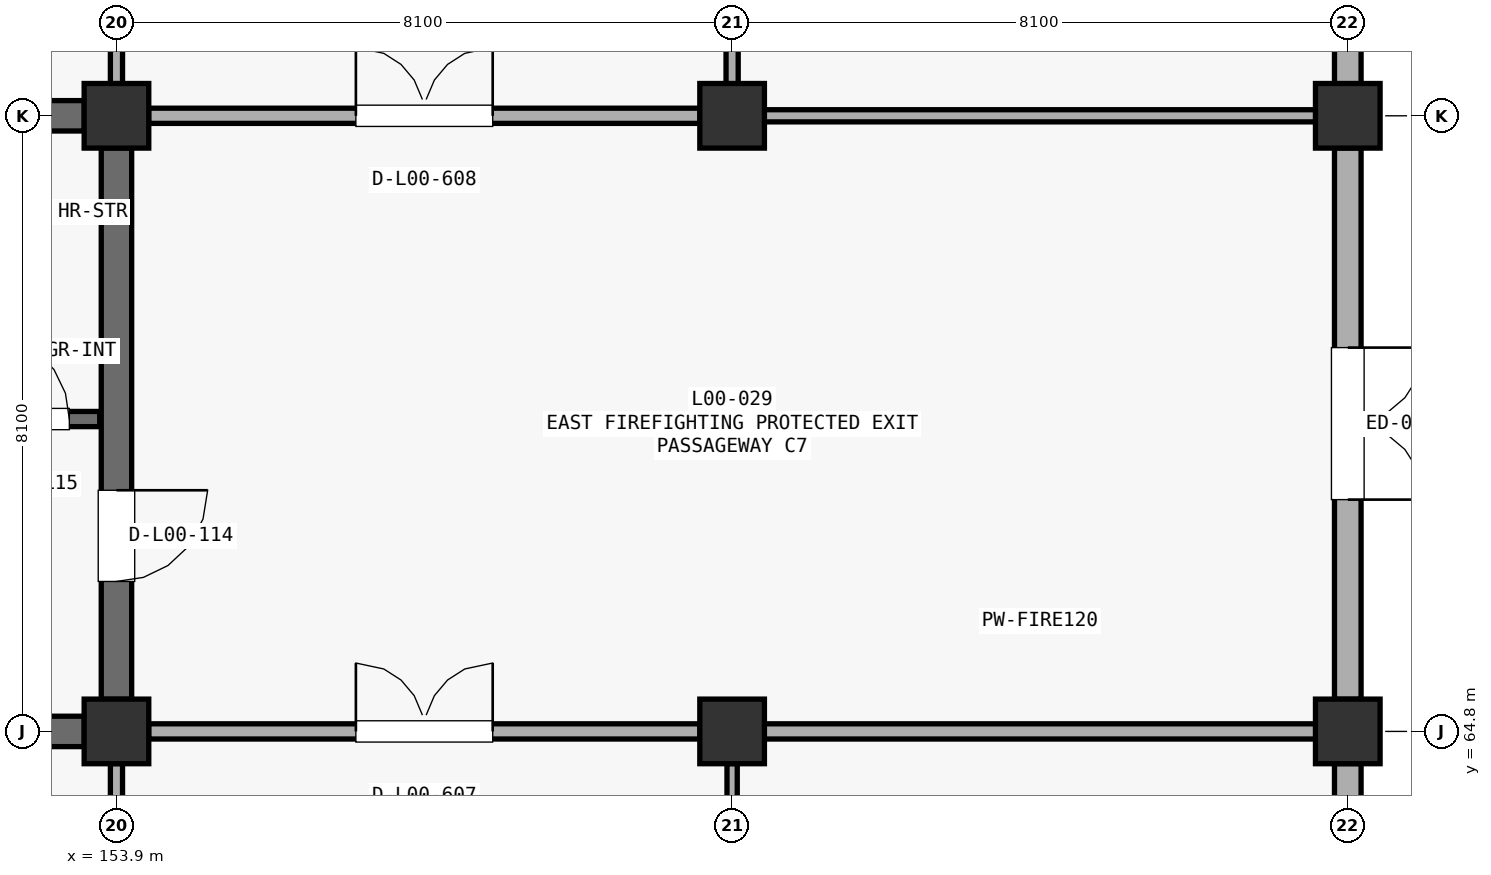
"""IFC4 building model, lengths in metres.
Left out: names, types, materials, properties, quantities, classifications, styles, units other than length and angle.
Written with IfcOpenShell. Run it as: python <this file> out.ifc"""

import sys

from ifc_helpers import new_model, si_unit, direction, frame, frame_2d, origin, origin_2d, place, context, subcontext, project, spatial, rectangle, extrude, element, fill, save


model = new_model("IFC4")
c1 = context("Model", 3, precision=1e-05, world=origin(), true_north=direction((0.0, 1.0)))
c2 = subcontext(c1, "Body", "Model", "MODEL_VIEW")
j1 = project(units=[si_unit("LENGTHUNIT", "METRE"), si_unit("PLANEANGLEUNIT", "RADIAN")], contexts=[c1])
p1 = place(None, origin())
s1 = spatial("IfcSite", under=j1, at=p1, CompositionType="ELEMENT")
p2 = place(p1, origin())
s2 = spatial("IfcBuilding", under=s1, at=p2, CompositionType="ELEMENT")
p3 = place(p2, origin())
s3 = spatial("IfcBuildingStorey", under=s2, at=p3, CompositionType="ELEMENT", Elevation=0.0)
for number, where, z_axis, x_axis in (
    (1, (153.9, 64.8, 0.0), (0.0, 0.0, 1.0), (1.0, 0.0, 0.0)),
    (2, (153.9, 72.9, 0.0), (0.0, 0.0, 1.0), (1.0, 0.0, 0.0)),
    (3, (162.0, 64.8, 0.0), (0.0, 0.0, 1.0), (1.0, 0.0, 0.0)),
    (4, (162.0, 72.9, 0.0), (0.0, 0.0, 1.0), (1.0, 0.0, 0.0)),
    (5, (170.1, 64.8, 0.0), (0.0, 0.0, 1.0), (1.0, 0.0, 0.0)),
    (6, (170.1, 72.9, 0.0), (0.0, 0.0, 1.0), (1.0, 0.0, 0.0)),
):
    element("IfcColumn", number, at=place(p3, frame(where, z_axis=z_axis, x_axis=x_axis)), inside=s3, PredefinedType="COLUMN", context=c2, shape_type="SweptSolid", body=[
        extrude(rectangle(XDim=0.85, YDim=0.85, at=origin_2d()), origin(), (0.0, 0.0, 1.0), 5.1),
    ])
p4 = place(p3, frame((170.1, 57.123, 0.0), z_axis=(0.0, 0.0, 1.0), x_axis=(0.0, 1.0, 0.0)))
e7 = element("IfcWall", 7, at=p4, inside=s3, PredefinedType="STANDARD", context=c2, shape_type="SweptSolid", body=[
    extrude(rectangle(XDim=7.254, YDim=0.35, at=frame_2d((3.627, 0.0))), origin(), (0.0, 0.0, 1.0), 4.172),
])
p5 = place(p4, frame((2.952, 0.0, 0.85)))
e8 = element("IfcOpeningElement", 8, at=p5, cuts=e7, PredefinedType="OPENING", context=c2, shape_type="SweptSolid", body=[
    extrude(rectangle(XDim=1.35, YDim=1.95, at=frame_2d((0.675, 0.975))), frame((0.0, 0.185, 0.0), z_axis=(0.0, -1.0, 0.0), x_axis=(1.0, 0.0, 0.0)), (0.0, 0.0, 1.0), 0.37),
])
p6 = place(p3, frame((170.1, 65.223, 0.0), z_axis=(0.0, 0.0, 1.0), x_axis=(0.0, 1.0, 0.0)))
e9 = element("IfcWall", 9, at=p6, inside=s3, PredefinedType="STANDARD", context=c2, shape_type="SweptSolid", body=[
    extrude(rectangle(XDim=7.254, YDim=0.35, at=frame_2d((3.627, 0.0))), origin(), (0.0, 0.0, 1.0), 4.172),
])
p7 = place(p6, frame((4.627, 0.0, 0.0), z_axis=(0.0, 0.0, 1.0), x_axis=(-1.0, 0.0, 0.0)))
e10 = element("IfcOpeningElement", 10, at=p7, cuts=e9, PredefinedType="OPENING", context=c2, shape_type="SweptSolid", body=[
    extrude(rectangle(XDim=2.0, YDim=2.2, at=frame_2d((1.0, 1.1))), frame((0.0, 0.185, 0.0), z_axis=(0.0, -1.0, 0.0), x_axis=(1.0, 0.0, 0.0)), (0.0, 0.0, 1.0), 0.37),
])
p8 = place(p3, frame((170.1, 73.323, 0.0), z_axis=(0.0, 0.0, 1.0), x_axis=(0.0, 1.0, 0.0)))
e11 = element("IfcWall", 11, at=p8, inside=s3, PredefinedType="STANDARD", context=c2, shape_type="SweptSolid", body=[
    extrude(rectangle(XDim=7.254, YDim=0.35, at=frame_2d((3.627, 0.0))), origin(), (0.0, 0.0, 1.0), 4.222),
])
p9 = place(p8, frame((2.502, 0.0, 0.85)))
e12 = element("IfcOpeningElement", 12, at=p9, cuts=e11, PredefinedType="OPENING", context=c2, shape_type="SweptSolid", body=[
    extrude(rectangle(XDim=2.25, YDim=1.75, at=frame_2d((1.125, 0.875))), frame((0.0, 0.185, 0.0), z_axis=(0.0, -1.0, 0.0), x_axis=(1.0, 0.0, 0.0)), (0.0, 0.0, 1.0), 0.37),
])
p10 = place(p3, frame((146.223, 72.9, 0.0), z_axis=(0.0, 0.0, 1.0), x_axis=(1.0, 0.0, 0.0)))
e13 = element("IfcWall", 13, at=p10, inside=s3, PredefinedType="SHEAR", context=c2, shape_type="SweptSolid", body=[
    extrude(rectangle(XDim=7.254, YDim=0.4, at=frame_2d((3.627, 0.0))), origin(), (0.0, 0.0, 1.0), 4.822),
])
p11 = place(p3, frame((153.9, 65.223, 0.0), z_axis=(0.0, 0.0, 1.0), x_axis=(0.0, 1.0, 0.0)))
e14 = element("IfcWall", 14, at=p11, inside=s3, PredefinedType="SHEAR", context=c2, shape_type="SweptSolid", body=[
    extrude(rectangle(XDim=7.254, YDim=0.4, at=frame_2d((3.627, 0.0))), origin(), (0.0, 0.0, 1.0), 4.822),
])
p12 = place(p11, frame((2.75, 0.0, 0.0), z_axis=(0.0, 0.0, 1.0), x_axis=(-1.0, 0.0, 0.0)))
e15 = element("IfcOpeningElement", 15, at=p12, cuts=e14, PredefinedType="OPENING", context=c2, shape_type="SweptSolid", body=[
    extrude(rectangle(XDim=1.2, YDim=2.2, at=frame_2d((0.6, 1.1))), frame((0.0, 0.21, 0.0), z_axis=(0.0, -1.0, 0.0), x_axis=(1.0, 0.0, 0.0)), (0.0, 0.0, 1.0), 0.42),
])
p13 = place(p3, frame((146.223, 64.8, 0.0), z_axis=(0.0, 0.0, 1.0), x_axis=(1.0, 0.0, 0.0)))
e16 = element("IfcWall", 16, at=p13, inside=s3, PredefinedType="SHEAR", context=c2, shape_type="SweptSolid", body=[
    extrude(rectangle(XDim=7.254, YDim=0.4, at=frame_2d((3.627, 0.0))), origin(), (0.0, 0.0, 1.0), 4.822),
])
p14 = place(p3, frame((146.02, 68.91, 0.0), z_axis=(0.0, 0.0, 1.0), x_axis=(1.0, 0.0, 0.0)))
e17 = element("IfcWall", 17, at=p14, inside=s3, PredefinedType="SHEAR", context=c2, shape_type="SweptSolid", body=[
    extrude(rectangle(XDim=7.66, YDim=0.2, at=frame_2d((3.83, 0.0))), origin(), (0.0, 0.0, 1.0), 4.822),
])
p15 = place(p14, frame((6.11, 0.0, 0.0)))
e18 = element("IfcOpeningElement", 18, at=p15, cuts=e17, PredefinedType="OPENING", context=c2, shape_type="SweptSolid", body=[
    extrude(rectangle(XDim=1.15, YDim=2.2, at=frame_2d((0.575, 1.1))), frame((0.0, 0.11, 0.0), z_axis=(0.0, -1.0, 0.0), x_axis=(1.0, 0.0, 0.0)), (0.0, 0.0, 1.0), 0.22),
])
p16 = place(p3, frame((153.9, 73.323, 0.0), z_axis=(0.0, 0.0, 1.0), x_axis=(0.0, 1.0, 0.0)))
e19 = element("IfcWall", 19, at=p16, inside=s3, PredefinedType="PARTITIONING", context=c2, shape_type="SweptSolid", body=[
    extrude(rectangle(XDim=7.254, YDim=0.16, at=frame_2d((3.627, 0.0))), origin(), (0.0, 0.0, 1.0), 3.972),
])
p17 = place(p16, frame((2.917, 0.0, 0.0)))
e20 = element("IfcOpeningElement", 20, at=p17, cuts=e19, PredefinedType="OPENING", context=c2, shape_type="SweptSolid", body=[
    extrude(rectangle(XDim=1.42, YDim=2.25, at=frame_2d((0.71, 1.125))), frame((0.0, 0.09, 0.0), z_axis=(0.0, -1.0, 0.0), x_axis=(1.0, 0.0, 0.0)), (0.0, 0.0, 1.0), 0.18),
])
p18 = place(p3, frame((162.0, 57.123, 0.0), z_axis=(0.0, 0.0, 1.0), x_axis=(0.0, 1.0, 0.0)))
e21 = element("IfcWall", 21, at=p18, inside=s3, PredefinedType="PARTITIONING", context=c2, shape_type="SweptSolid", body=[
    extrude(rectangle(XDim=7.254, YDim=0.135, at=frame_2d((3.627, 0.0))), origin(), (0.0, 0.0, 1.0), 3.972),
])
p19 = place(p3, frame((162.423, 64.8, 0.0), z_axis=(0.0, 0.0, 1.0), x_axis=(1.0, 0.0, 0.0)))
e22 = element("IfcWall", 22, at=p19, inside=s3, PredefinedType="PARTITIONING", context=c2, shape_type="SweptSolid", body=[
    extrude(rectangle(XDim=7.254, YDim=0.2, at=frame_2d((3.627, 0.0))), origin(), (0.0, 0.0, 1.0), 3.872),
])
p20 = place(p3, frame((162.0, 73.323, 0.0), z_axis=(0.0, 0.0, 1.0), x_axis=(0.0, 1.0, 0.0)))
e23 = element("IfcWall", 23, at=p20, inside=s3, PredefinedType="PARTITIONING", context=c2, shape_type="SweptSolid", body=[
    extrude(rectangle(XDim=7.254, YDim=0.16, at=frame_2d((3.627, 0.0))), origin(), (0.0, 0.0, 1.0), 4.072),
])
p21 = place(p20, frame((2.877, 0.0, 0.0)))
e24 = element("IfcOpeningElement", 24, at=p21, cuts=e23, PredefinedType="OPENING", context=c2, shape_type="SweptSolid", body=[
    extrude(rectangle(XDim=1.5, YDim=2.2, at=frame_2d((0.75, 1.1))), frame((0.0, 0.09, 0.0), z_axis=(0.0, -1.0, 0.0), x_axis=(1.0, 0.0, 0.0)), (0.0, 0.0, 1.0), 0.18),
])
p22 = place(p3, frame((162.423, 72.9, 0.0), z_axis=(0.0, 0.0, 1.0), x_axis=(1.0, 0.0, 0.0)))
e25 = element("IfcWall", 25, at=p22, inside=s3, PredefinedType="PARTITIONING", context=c2, shape_type="SweptSolid", body=[
    extrude(rectangle(XDim=7.254, YDim=0.16, at=frame_2d((3.627, 0.0))), origin(), (0.0, 0.0, 1.0), 4.072),
])
p23 = place(p3, frame((153.9, 57.123, 0.0), z_axis=(0.0, 0.0, 1.0), x_axis=(0.0, 1.0, 0.0)))
e26 = element("IfcWall", 26, at=p23, inside=s3, PredefinedType="PARTITIONING", context=c2, shape_type="SweptSolid", body=[
    extrude(rectangle(XDim=7.254, YDim=0.16, at=frame_2d((3.627, 0.0))), origin(), (0.0, 0.0, 1.0), 4.172),
])
p24 = place(p23, frame((3.027, 0.0, 0.0)))
e27 = element("IfcOpeningElement", 27, at=p24, cuts=e26, PredefinedType="OPENING", context=c2, shape_type="SweptSolid", body=[
    extrude(rectangle(XDim=1.2, YDim=2.2, at=frame_2d((0.6, 1.1))), frame((0.0, 0.09, 0.0), z_axis=(0.0, -1.0, 0.0), x_axis=(1.0, 0.0, 0.0)), (0.0, 0.0, 1.0), 0.18),
])
p25 = place(p3, frame((154.323, 64.8, 0.0), z_axis=(0.0, 0.0, 1.0), x_axis=(1.0, 0.0, 0.0)))
e28 = element("IfcWall", 28, at=p25, inside=s3, PredefinedType="PARTITIONING", context=c2, shape_type="SweptSolid", body=[
    extrude(rectangle(XDim=7.254, YDim=0.2, at=frame_2d((3.627, 0.0))), origin(), (0.0, 0.0, 1.0), 3.972),
])
p26 = place(p25, frame((2.727, 0.0, 0.0)))
e29 = element("IfcOpeningElement", 29, at=p26, cuts=e28, PredefinedType="OPENING", context=c2, shape_type="SweptSolid", body=[
    extrude(rectangle(XDim=1.8, YDim=2.2, at=frame_2d((0.9, 1.1))), frame((0.0, 0.11, 0.0), z_axis=(0.0, -1.0, 0.0), x_axis=(1.0, 0.0, 0.0)), (0.0, 0.0, 1.0), 0.22),
])
p27 = place(p3, frame((154.323, 72.9, 0.0), z_axis=(0.0, 0.0, 1.0), x_axis=(1.0, 0.0, 0.0)))
e30 = element("IfcWall", 30, at=p27, inside=s3, PredefinedType="PARTITIONING", context=c2, shape_type="SweptSolid", body=[
    extrude(rectangle(XDim=7.254, YDim=0.2, at=frame_2d((3.627, 0.0))), origin(), (0.0, 0.0, 1.0), 3.872),
])
p28 = place(p27, frame((2.727, 0.0, 0.0)))
e31 = element("IfcOpeningElement", 31, at=p28, cuts=e30, PredefinedType="OPENING", context=c2, shape_type="SweptSolid", body=[
    extrude(rectangle(XDim=1.8, YDim=2.2, at=frame_2d((0.9, 1.1))), frame((0.0, 0.11, 0.0), z_axis=(0.0, -1.0, 0.0), x_axis=(1.0, 0.0, 0.0)), (0.0, 0.0, 1.0), 0.22),
])
p29 = place(p7, origin())
e32 = element("IfcDoor", 32, at=p29, inside=s3, OperationType="DOUBLE_SWING_LEFT", PredefinedType="DOOR", context=c2, shape_type="SweptSolid", body=[
    extrude(rectangle(XDim=2.0, YDim=2.2, at=frame_2d((1.0, 1.1))), frame((0.0, 0.025, 0.0), z_axis=(0.0, -1.0, 0.0), x_axis=(1.0, 0.0, 0.0)), (0.0, 0.0, 1.0), 0.05),
])
fill(e10, e32)
p30 = place(p12, origin())
e33 = element("IfcDoor", 33, at=p30, inside=s3, OperationType="SINGLE_SWING_RIGHT", PredefinedType="DOOR", context=c2, shape_type="SweptSolid", body=[
    extrude(rectangle(XDim=1.2, YDim=2.2, at=frame_2d((0.6, 1.1))), frame((0.0, 0.025, 0.0), z_axis=(0.0, -1.0, 0.0), x_axis=(1.0, 0.0, 0.0)), (0.0, 0.0, 1.0), 0.05),
])
fill(e15, e33)
p31 = place(p15, origin())
e34 = element("IfcDoor", 34, at=p31, inside=s3, OperationType="SINGLE_SWING_LEFT", PredefinedType="DOOR", context=c2, shape_type="SweptSolid", body=[
    extrude(rectangle(XDim=1.15, YDim=2.2, at=frame_2d((0.575, 1.1))), frame((0.0, 0.025, 0.0), z_axis=(0.0, -1.0, 0.0), x_axis=(1.0, 0.0, 0.0)), (0.0, 0.0, 1.0), 0.05),
])
fill(e18, e34)
p32 = place(p26, origin())
e35 = element("IfcDoor", 35, at=p32, inside=s3, OperationType="DOUBLE_SWING_LEFT", PredefinedType="DOOR", context=c2, shape_type="SweptSolid", body=[
    extrude(rectangle(XDim=1.8, YDim=2.2, at=frame_2d((0.9, 1.1))), frame((0.0, 0.025, 0.0), z_axis=(0.0, -1.0, 0.0), x_axis=(1.0, 0.0, 0.0)), (0.0, 0.0, 1.0), 0.05),
])
fill(e29, e35)
p33 = place(p28, origin())
e36 = element("IfcDoor", 36, at=p33, inside=s3, OperationType="DOUBLE_SWING_LEFT", PredefinedType="DOOR", context=c2, shape_type="SweptSolid", body=[
    extrude(rectangle(XDim=1.8, YDim=2.2, at=frame_2d((0.9, 1.1))), frame((0.0, 0.025, 0.0), z_axis=(0.0, -1.0, 0.0), x_axis=(1.0, 0.0, 0.0)), (0.0, 0.0, 1.0), 0.05),
])
fill(e31, e36)
save(model, sys.argv[1])
